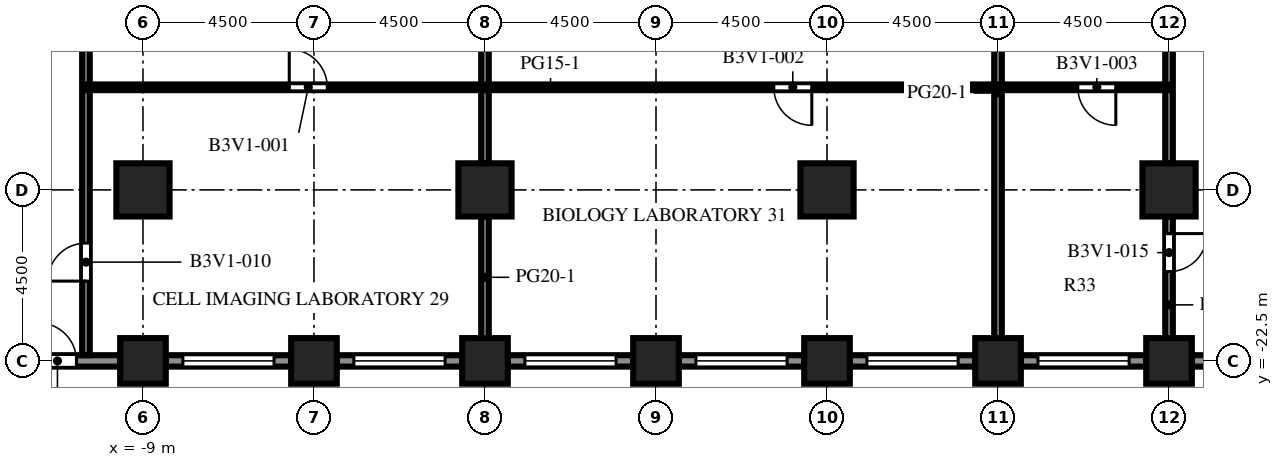
"""IFC4 building model, lengths in metres.
Left out: names, types, materials, properties, quantities, classifications, styles, units other than length and angle.
Written with IfcOpenShell. Run it as: python <this file> out.ifc"""

import sys

from ifc_helpers import new_model, si_unit, direction, frame, frame_2d, origin, origin_2d, place, context, subcontext, project, spatial, rectangle, extrude, element, fill, save


model = new_model("IFC4")
c1 = context("Model", 3, precision=1e-05, world=origin(), true_north=direction((0.0, 1.0)))
c2 = subcontext(c1, "Body", "Model", "MODEL_VIEW")
j1 = project(units=[si_unit("LENGTHUNIT", "METRE"), si_unit("PLANEANGLEUNIT", "RADIAN")], contexts=[c1])
p1 = place(None, origin())
s1 = spatial("IfcSite", under=j1, at=p1, CompositionType="ELEMENT")
p2 = place(p1, origin())
s2 = spatial("IfcBuilding", under=s1, at=p2, CompositionType="ELEMENT")
p3 = place(p2, frame((0.0, 0.0, 90.2)))
s3 = spatial("IfcBuildingStorey", under=s2, at=p3, CompositionType="ELEMENT", Elevation=90.2)
for number, where, z_axis, x_axis in (
    (1, (-9.0, -22.5, 0.0), (0.0, 0.0, 1.0), (1.0, 0.0, 0.0)),
    (2, (-4.5, -22.5, 0.0), (0.0, 0.0, 1.0), (1.0, 0.0, 0.0)),
    (3, (0.0, -22.5, 0.0), (0.0, 0.0, 1.0), (1.0, 0.0, 0.0)),
    (4, (4.5, -22.5, 0.0), (0.0, 0.0, 1.0), (1.0, 0.0, 0.0)),
    (5, (9.0, -22.5, 0.0), (0.0, 0.0, 1.0), (1.0, 0.0, 0.0)),
    (6, (13.5, -22.5, 0.0), (0.0, 0.0, 1.0), (1.0, 0.0, 0.0)),
    (7, (18.0, -22.5, 0.0), (0.0, 0.0, 1.0), (1.0, 0.0, 0.0)),
):
    element("IfcColumn", number, at=place(p3, frame(where, z_axis=z_axis, x_axis=x_axis)), inside=s3, PredefinedType="COLUMN", context=c2, shape_type="SweptSolid", body=[
        extrude(rectangle(XDim=1.2, YDim=1.2, at=origin_2d()), origin(), (0.0, 0.0, 1.0), 4.1),
    ])
for number, where, z_axis, x_axis in (
    (8, (-9.0, -18.0, 0.0), (0.0, 0.0, 1.0), (1.0, 0.0, 0.0)),
    (9, (0.0, -18.0, 0.0), (0.0, 0.0, 1.0), (1.0, 0.0, 0.0)),
    (10, (9.0, -18.0, 0.0), (0.0, 0.0, 1.0), (1.0, 0.0, 0.0)),
    (11, (18.0, -18.0, 0.0), (0.0, 0.0, 1.0), (1.0, 0.0, 0.0)),
):
    element("IfcColumn", number, at=place(p3, frame(where, z_axis=z_axis, x_axis=x_axis)), inside=s3, PredefinedType="COLUMN", context=c2, shape_type="SweptSolid", body=[
        extrude(rectangle(XDim=1.4, YDim=1.4, at=origin_2d()), origin(), (0.0, 0.0, 1.0), 4.1),
    ])
p4 = place(p3, frame((-9.6, -22.5, 0.0), z_axis=(0.0, 0.0, 1.0), x_axis=(-1.0, 0.0, 0.0)))
e12 = element("IfcWall", 12, at=p4, inside=s3, PredefinedType="SOLIDWALL", context=c2, shape_type="SweptSolid", body=[
    extrude(rectangle(XDim=3.3, YDim=0.3, at=frame_2d((1.65, 0.0))), origin(), (0.0, 0.0, 1.0), 2.75),
])
p5 = place(p4, frame((1.15, 0.0, 0.0)))
e13 = element("IfcOpeningElement", 13, at=p5, cuts=e12, PredefinedType="OPENING", context=c2, shape_type="SweptSolid", body=[
    extrude(rectangle(XDim=1.0, YDim=2.2, at=frame_2d((0.5, 1.1))), frame((0.0, 0.16, 0.0), z_axis=(0.0, -1.0, 0.0), x_axis=(1.0, 0.0, 0.0)), (0.0, 0.0, 1.0), 0.32),
])
p6 = place(p3, frame((-5.1, -22.5, 0.0), z_axis=(0.0, 0.0, 1.0), x_axis=(-1.0, 0.0, 0.0)))
e14 = element("IfcWall", 14, at=p6, inside=s3, PredefinedType="SOLIDWALL", context=c2, shape_type="SweptSolid", body=[
    extrude(rectangle(XDim=3.3, YDim=0.3, at=frame_2d((1.65, 0.0))), origin(), (0.0, 0.0, 1.0), 2.75),
])
p7 = place(p6, frame((0.45, 0.0, 0.8)))
e15 = element("IfcOpeningElement", 15, at=p7, cuts=e14, PredefinedType="OPENING", context=c2, shape_type="SweptSolid", body=[
    extrude(rectangle(XDim=2.4, YDim=1.7, at=frame_2d((1.2, 0.85))), frame((0.0, 0.16, 0.0), z_axis=(0.0, -1.0, 0.0), x_axis=(1.0, 0.0, 0.0)), (0.0, 0.0, 1.0), 0.32),
])
p8 = place(p3, frame((-0.6, -22.5, 0.0), z_axis=(0.0, 0.0, 1.0), x_axis=(-1.0, 0.0, 0.0)))
e16 = element("IfcWall", 16, at=p8, inside=s3, PredefinedType="SOLIDWALL", context=c2, shape_type="SweptSolid", body=[
    extrude(rectangle(XDim=3.3, YDim=0.3, at=frame_2d((1.65, 0.0))), origin(), (0.0, 0.0, 1.0), 2.75),
])
p9 = place(p8, frame((0.45, 0.0, 0.8)))
e17 = element("IfcOpeningElement", 17, at=p9, cuts=e16, PredefinedType="OPENING", context=c2, shape_type="SweptSolid", body=[
    extrude(rectangle(XDim=2.4, YDim=1.7, at=frame_2d((1.2, 0.85))), frame((0.0, 0.16, 0.0), z_axis=(0.0, -1.0, 0.0), x_axis=(1.0, 0.0, 0.0)), (0.0, 0.0, 1.0), 0.32),
])
p10 = place(p3, frame((3.9, -22.5, 0.0), z_axis=(0.0, 0.0, 1.0), x_axis=(-1.0, 0.0, 0.0)))
e18 = element("IfcWall", 18, at=p10, inside=s3, PredefinedType="SOLIDWALL", context=c2, shape_type="SweptSolid", body=[
    extrude(rectangle(XDim=3.3, YDim=0.3, at=frame_2d((1.65, 0.0))), origin(), (0.0, 0.0, 1.0), 2.75),
])
p11 = place(p10, frame((0.45, 0.0, 0.8)))
e19 = element("IfcOpeningElement", 19, at=p11, cuts=e18, PredefinedType="OPENING", context=c2, shape_type="SweptSolid", body=[
    extrude(rectangle(XDim=2.4, YDim=1.7, at=frame_2d((1.2, 0.85))), frame((0.0, 0.16, 0.0), z_axis=(0.0, -1.0, 0.0), x_axis=(1.0, 0.0, 0.0)), (0.0, 0.0, 1.0), 0.32),
])
p12 = place(p3, frame((8.4, -22.5, 0.0), z_axis=(0.0, 0.0, 1.0), x_axis=(-1.0, 0.0, 0.0)))
e20 = element("IfcWall", 20, at=p12, inside=s3, PredefinedType="SOLIDWALL", context=c2, shape_type="SweptSolid", body=[
    extrude(rectangle(XDim=3.3, YDim=0.3, at=frame_2d((1.65, 0.0))), origin(), (0.0, 0.0, 1.0), 2.75),
])
p13 = place(p12, frame((0.45, 0.0, 0.8)))
e21 = element("IfcOpeningElement", 21, at=p13, cuts=e20, PredefinedType="OPENING", context=c2, shape_type="SweptSolid", body=[
    extrude(rectangle(XDim=2.4, YDim=1.7, at=frame_2d((1.2, 0.85))), frame((0.0, 0.16, 0.0), z_axis=(0.0, -1.0, 0.0), x_axis=(1.0, 0.0, 0.0)), (0.0, 0.0, 1.0), 0.32),
])
p14 = place(p3, frame((12.9, -22.5, 0.0), z_axis=(0.0, 0.0, 1.0), x_axis=(-1.0, 0.0, 0.0)))
e22 = element("IfcWall", 22, at=p14, inside=s3, PredefinedType="SOLIDWALL", context=c2, shape_type="SweptSolid", body=[
    extrude(rectangle(XDim=3.3, YDim=0.3, at=frame_2d((1.65, 0.0))), origin(), (0.0, 0.0, 1.0), 2.75),
])
p15 = place(p14, frame((0.45, 0.0, 0.8)))
e23 = element("IfcOpeningElement", 23, at=p15, cuts=e22, PredefinedType="OPENING", context=c2, shape_type="SweptSolid", body=[
    extrude(rectangle(XDim=2.4, YDim=1.7, at=frame_2d((1.2, 0.85))), frame((0.0, 0.16, 0.0), z_axis=(0.0, -1.0, 0.0), x_axis=(1.0, 0.0, 0.0)), (0.0, 0.0, 1.0), 0.32),
])
p16 = place(p3, frame((17.4, -22.5, 0.0), z_axis=(0.0, 0.0, 1.0), x_axis=(-1.0, 0.0, 0.0)))
e24 = element("IfcWall", 24, at=p16, inside=s3, PredefinedType="SOLIDWALL", context=c2, shape_type="SweptSolid", body=[
    extrude(rectangle(XDim=3.3, YDim=0.3, at=frame_2d((1.65, 0.0))), origin(), (0.0, 0.0, 1.0), 2.75),
])
p17 = place(p16, frame((0.45, 0.0, 0.8)))
e25 = element("IfcOpeningElement", 25, at=p17, cuts=e24, PredefinedType="OPENING", context=c2, shape_type="SweptSolid", body=[
    extrude(rectangle(XDim=2.4, YDim=1.7, at=frame_2d((1.2, 0.85))), frame((0.0, 0.16, 0.0), z_axis=(0.0, -1.0, 0.0), x_axis=(1.0, 0.0, 0.0)), (0.0, 0.0, 1.0), 0.32),
])
p18 = place(p3, frame((21.9, -22.5, 0.0), z_axis=(0.0, 0.0, 1.0), x_axis=(-1.0, 0.0, 0.0)))
e26 = element("IfcWall", 26, at=p18, inside=s3, PredefinedType="SOLIDWALL", context=c2, shape_type="SweptSolid", body=[
    extrude(rectangle(XDim=3.3, YDim=0.3, at=frame_2d((1.65, 0.0))), origin(), (0.0, 0.0, 1.0), 2.75),
])
p19 = place(p18, frame((1.15, 0.0, 0.0)))
e27 = element("IfcOpeningElement", 27, at=p19, cuts=e26, PredefinedType="OPENING", context=c2, shape_type="SweptSolid", body=[
    extrude(rectangle(XDim=1.0, YDim=2.2, at=frame_2d((0.5, 1.1))), frame((0.0, 0.16, 0.0), z_axis=(0.0, -1.0, 0.0), x_axis=(1.0, 0.0, 0.0)), (0.0, 0.0, 1.0), 0.32),
])
p20 = place(p3, frame((-10.5, -9.0, 0.0), z_axis=(0.0, 0.0, 1.0), x_axis=(0.0, -1.0, 0.0)))
e28 = element("IfcWall", 28, at=p20, inside=s3, PredefinedType="PARTITIONING", context=c2, shape_type="SweptSolid", body=[
    extrude(rectangle(XDim=13.35, YDim=0.2, at=frame_2d((6.675, 0.0))), origin(), (0.0, 0.0, 1.0), 3.65),
])
p21 = place(p20, frame((10.4, 0.0, 0.0)))
e29 = element("IfcOpeningElement", 29, at=p21, cuts=e28, PredefinedType="OPENING", context=c2, shape_type="SweptSolid", body=[
    extrude(rectangle(XDim=1.0, YDim=2.1, at=frame_2d((0.5, 1.05))), frame((0.0, 0.11, 0.0), z_axis=(0.0, -1.0, 0.0), x_axis=(1.0, 0.0, 0.0)), (0.0, 0.0, 1.0), 0.22),
])
p22 = place(p3, frame((0.0, -21.9, 0.0), z_axis=(0.0, 0.0, 1.0), x_axis=(0.0, 1.0, 0.0)))
e30 = element("IfcWall", 30, at=p22, inside=s3, PredefinedType="PARTITIONING", context=c2, shape_type="SweptSolid", body=[
    extrude(rectangle(XDim=3.2, YDim=0.2, at=frame_2d((1.6, 0.0))), origin(), (0.0, 0.0, 1.0), 3.65),
])
p23 = place(p3, frame((0.0, -17.3, 0.0), z_axis=(0.0, 0.0, 1.0), x_axis=(0.0, 1.0, 0.0)))
e31 = element("IfcWall", 31, at=p23, inside=s3, PredefinedType="PARTITIONING", context=c2, shape_type="SweptSolid", body=[
    extrude(rectangle(XDim=8.3, YDim=0.2, at=frame_2d((4.15, 0.0))), origin(), (0.0, 0.0, 1.0), 3.65),
])
p24 = place(p3, frame((13.5, -21.9, 0.0), z_axis=(0.0, 0.0, 1.0), x_axis=(0.0, 1.0, 0.0)))
e32 = element("IfcWall", 32, at=p24, inside=s3, PredefinedType="PARTITIONING", context=c2, shape_type="SweptSolid", body=[
    extrude(rectangle(XDim=12.9, YDim=0.2, at=frame_2d((6.45, 0.0))), origin(), (0.0, 0.0, 1.0), 3.65),
])
p25 = place(p3, frame((18.0, -21.9, 0.0), z_axis=(0.0, 0.0, 1.0), x_axis=(0.0, 1.0, 0.0)))
e33 = element("IfcWall", 33, at=p25, inside=s3, PredefinedType="PARTITIONING", context=c2, shape_type="SweptSolid", body=[
    extrude(rectangle(XDim=3.2, YDim=0.2, at=frame_2d((1.6, 0.0))), origin(), (0.0, 0.0, 1.0), 3.65),
])
p26 = place(p25, frame((1.75, 0.0, 0.0)))
e34 = element("IfcOpeningElement", 34, at=p26, cuts=e33, PredefinedType="OPENING", context=c2, shape_type="SweptSolid", body=[
    extrude(rectangle(XDim=1.0, YDim=2.1, at=frame_2d((0.5, 1.05))), frame((0.0, 0.11, 0.0), z_axis=(0.0, -1.0, 0.0), x_axis=(1.0, 0.0, 0.0)), (0.0, 0.0, 1.0), 0.22),
])
p27 = place(p3, frame((18.0, -17.3, 0.0), z_axis=(0.0, 0.0, 1.0), x_axis=(0.0, 1.0, 0.0)))
e35 = element("IfcWall", 35, at=p27, inside=s3, PredefinedType="PARTITIONING", context=c2, shape_type="SweptSolid", body=[
    extrude(rectangle(XDim=8.3, YDim=0.2, at=frame_2d((4.15, 0.0))), origin(), (0.0, 0.0, 1.0), 3.65),
])
p28 = place(p3, frame((-10.5, -15.3, 0.0), z_axis=(0.0, 0.0, 1.0), x_axis=(1.0, 0.0, 0.0)))
e36 = element("IfcWall", 36, at=p28, inside=s3, PredefinedType="PARTITIONING", context=c2, shape_type="SweptSolid", body=[
    extrude(rectangle(XDim=28.5, YDim=0.15, at=frame_2d((14.25, 0.0))), origin(), (0.0, 0.0, 1.0), 3.65),
])
p29 = place(p28, frame((5.35, 0.0, 0.0)))
e37 = element("IfcOpeningElement", 37, at=p29, cuts=e36, PredefinedType="OPENING", context=c2, shape_type="SweptSolid", body=[
    extrude(rectangle(XDim=1.0, YDim=2.1, at=frame_2d((0.5, 1.05))), frame((0.0, 0.085, 0.0), z_axis=(0.0, -1.0, 0.0), x_axis=(1.0, 0.0, 0.0)), (0.0, 0.0, 1.0), 0.17),
])
p30 = place(p28, frame((18.1, 0.0, 0.0)))
e38 = element("IfcOpeningElement", 38, at=p30, cuts=e36, PredefinedType="OPENING", context=c2, shape_type="SweptSolid", body=[
    extrude(rectangle(XDim=1.0, YDim=2.1, at=frame_2d((0.5, 1.05))), frame((0.0, 0.085, 0.0), z_axis=(0.0, -1.0, 0.0), x_axis=(1.0, 0.0, 0.0)), (0.0, 0.0, 1.0), 0.17),
])
p31 = place(p28, frame((26.1, 0.0, 0.0)))
e39 = element("IfcOpeningElement", 39, at=p31, cuts=e36, PredefinedType="OPENING", context=c2, shape_type="SweptSolid", body=[
    extrude(rectangle(XDim=1.0, YDim=2.1, at=frame_2d((0.5, 1.05))), frame((0.0, 0.085, 0.0), z_axis=(0.0, -1.0, 0.0), x_axis=(1.0, 0.0, 0.0)), (0.0, 0.0, 1.0), 0.17),
])
p32 = place(p5, origin())
e40 = element("IfcDoor", 40, at=p32, inside=s3, OperationType="SINGLE_SWING_RIGHT", PredefinedType="DOOR", context=c2, shape_type="SweptSolid", body=[
    extrude(rectangle(XDim=1.0, YDim=2.2, at=frame_2d((0.5, 1.1))), frame((0.0, 0.025, 0.0), z_axis=(0.0, -1.0, 0.0), x_axis=(1.0, 0.0, 0.0)), (0.0, 0.0, 1.0), 0.05),
])
fill(e13, e40)
p33 = place(p7, origin())
e41 = element("IfcWindow", 41, at=p33, inside=s3, PartitioningType="SINGLE_PANEL", PredefinedType="WINDOW", context=c2, shape_type="SweptSolid", body=[
    extrude(rectangle(XDim=2.4, YDim=1.7, at=frame_2d((1.2, 0.85))), frame((0.0, 0.03, 0.0), z_axis=(0.0, -1.0, 0.0), x_axis=(1.0, 0.0, 0.0)), (0.0, 0.0, 1.0), 0.06),
])
fill(e15, e41)
p34 = place(p9, origin())
e42 = element("IfcWindow", 42, at=p34, inside=s3, PartitioningType="SINGLE_PANEL", PredefinedType="WINDOW", context=c2, shape_type="SweptSolid", body=[
    extrude(rectangle(XDim=2.4, YDim=1.7, at=frame_2d((1.2, 0.85))), frame((0.0, 0.03, 0.0), z_axis=(0.0, -1.0, 0.0), x_axis=(1.0, 0.0, 0.0)), (0.0, 0.0, 1.0), 0.06),
])
fill(e17, e42)
p35 = place(p11, origin())
e43 = element("IfcWindow", 43, at=p35, inside=s3, PartitioningType="SINGLE_PANEL", PredefinedType="WINDOW", context=c2, shape_type="SweptSolid", body=[
    extrude(rectangle(XDim=2.4, YDim=1.7, at=frame_2d((1.2, 0.85))), frame((0.0, 0.03, 0.0), z_axis=(0.0, -1.0, 0.0), x_axis=(1.0, 0.0, 0.0)), (0.0, 0.0, 1.0), 0.06),
])
fill(e19, e43)
p36 = place(p13, origin())
e44 = element("IfcWindow", 44, at=p36, inside=s3, PartitioningType="SINGLE_PANEL", PredefinedType="WINDOW", context=c2, shape_type="SweptSolid", body=[
    extrude(rectangle(XDim=2.4, YDim=1.7, at=frame_2d((1.2, 0.85))), frame((0.0, 0.03, 0.0), z_axis=(0.0, -1.0, 0.0), x_axis=(1.0, 0.0, 0.0)), (0.0, 0.0, 1.0), 0.06),
])
fill(e21, e44)
p37 = place(p15, origin())
e45 = element("IfcWindow", 45, at=p37, inside=s3, PartitioningType="SINGLE_PANEL", PredefinedType="WINDOW", context=c2, shape_type="SweptSolid", body=[
    extrude(rectangle(XDim=2.4, YDim=1.7, at=frame_2d((1.2, 0.85))), frame((0.0, 0.03, 0.0), z_axis=(0.0, -1.0, 0.0), x_axis=(1.0, 0.0, 0.0)), (0.0, 0.0, 1.0), 0.06),
])
fill(e23, e45)
p38 = place(p17, origin())
e46 = element("IfcWindow", 46, at=p38, inside=s3, PartitioningType="SINGLE_PANEL", PredefinedType="WINDOW", context=c2, shape_type="SweptSolid", body=[
    extrude(rectangle(XDim=2.4, YDim=1.7, at=frame_2d((1.2, 0.85))), frame((0.0, 0.03, 0.0), z_axis=(0.0, -1.0, 0.0), x_axis=(1.0, 0.0, 0.0)), (0.0, 0.0, 1.0), 0.06),
])
fill(e25, e46)
p39 = place(p29, origin())
e47 = element("IfcDoor", 47, at=p39, inside=s3, OperationType="SINGLE_SWING_LEFT", PredefinedType="DOOR", context=c2, shape_type="SweptSolid", body=[
    extrude(rectangle(XDim=1.0, YDim=2.1, at=frame_2d((0.5, 1.05))), frame((0.0, 0.025, 0.0), z_axis=(0.0, -1.0, 0.0), x_axis=(1.0, 0.0, 0.0)), (0.0, 0.0, 1.0), 0.05),
])
fill(e37, e47)
p40 = place(p30, origin())
e48 = element("IfcDoor", 48, at=p40, inside=s3, OperationType="SINGLE_SWING_RIGHT", PredefinedType="DOOR", context=c2, shape_type="SweptSolid", body=[
    extrude(rectangle(XDim=1.0, YDim=2.1, at=frame_2d((0.5, 1.05))), frame((0.0, 0.025, 0.0), z_axis=(0.0, -1.0, 0.0), x_axis=(1.0, 0.0, 0.0)), (0.0, 0.0, 1.0), 0.05),
])
fill(e38, e48)
p41 = place(p31, origin())
e49 = element("IfcDoor", 49, at=p41, inside=s3, OperationType="SINGLE_SWING_RIGHT", PredefinedType="DOOR", context=c2, shape_type="SweptSolid", body=[
    extrude(rectangle(XDim=1.0, YDim=2.1, at=frame_2d((0.5, 1.05))), frame((0.0, 0.025, 0.0), z_axis=(0.0, -1.0, 0.0), x_axis=(1.0, 0.0, 0.0)), (0.0, 0.0, 1.0), 0.05),
])
fill(e39, e49)
p42 = place(p21, origin())
e50 = element("IfcDoor", 50, at=p42, inside=s3, OperationType="SINGLE_SWING_RIGHT", PredefinedType="DOOR", context=c2, shape_type="SweptSolid", body=[
    extrude(rectangle(XDim=1.0, YDim=2.1, at=frame_2d((0.5, 1.05))), frame((0.0, 0.025, 0.0), z_axis=(0.0, -1.0, 0.0), x_axis=(1.0, 0.0, 0.0)), (0.0, 0.0, 1.0), 0.05),
])
fill(e29, e50)
p43 = place(p26, origin())
e51 = element("IfcDoor", 51, at=p43, inside=s3, OperationType="SINGLE_SWING_RIGHT", PredefinedType="DOOR", context=c2, shape_type="SweptSolid", body=[
    extrude(rectangle(XDim=1.0, YDim=2.1, at=frame_2d((0.5, 1.05))), frame((0.0, 0.025, 0.0), z_axis=(0.0, -1.0, 0.0), x_axis=(1.0, 0.0, 0.0)), (0.0, 0.0, 1.0), 0.05),
])
fill(e34, e51)
save(model, sys.argv[1])
